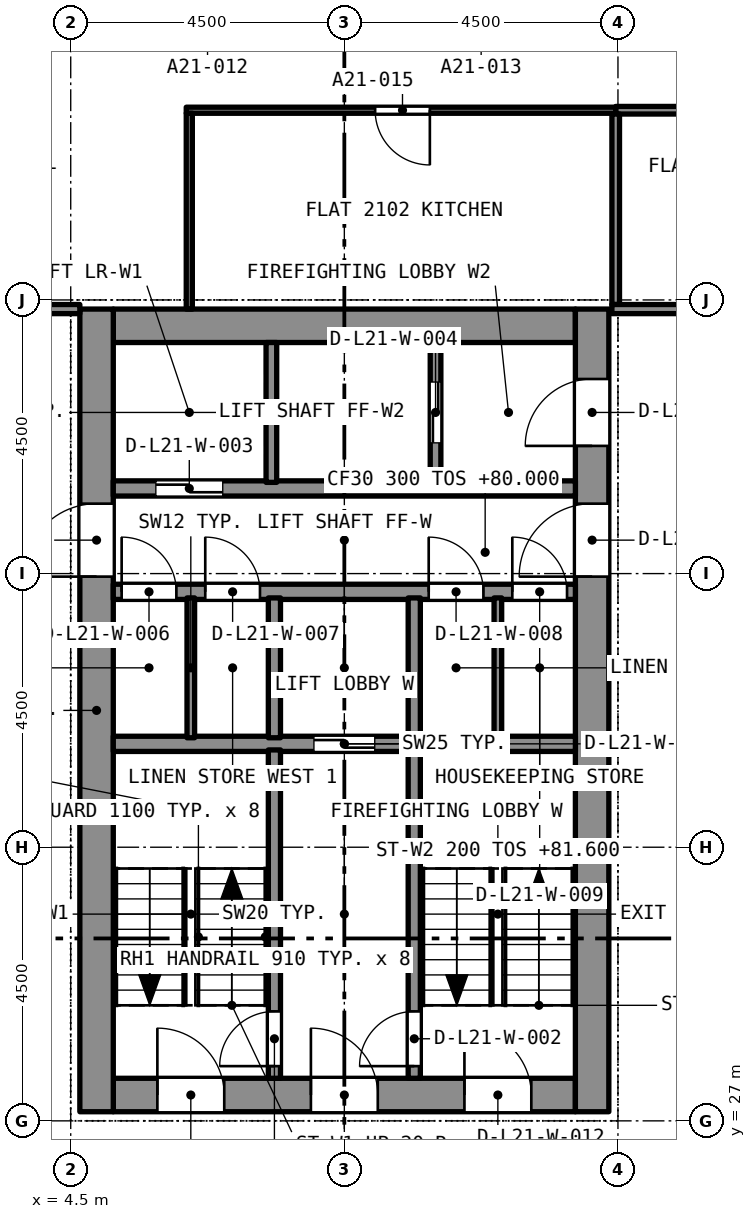
"""IFC4 building model, lengths in metres.
Left out: names, types, materials, properties, quantities, classifications, styles, units other than length and angle.
Written with IfcOpenShell. Run it as: python <this file> out.ifc"""

import sys

from ifc_helpers import new_model, si_unit, direction, frame, frame_2d, origin, place, context, subcontext, project, spatial, rectangle, extrude, element, fill, save


model = new_model("IFC4")
c1 = context("Model", 3, precision=1e-05, world=origin(), true_north=direction((0.0, 1.0)))
c2 = subcontext(c1, "Body", "Model", "MODEL_VIEW")
j1 = project(units=[si_unit("LENGTHUNIT", "METRE"), si_unit("PLANEANGLEUNIT", "RADIAN")], contexts=[c1])
p1 = place(None, origin())
s1 = spatial("IfcSite", under=j1, at=p1, CompositionType="ELEMENT")
p2 = place(p1, origin())
s2 = spatial("IfcBuilding", under=s1, at=p2, CompositionType="ELEMENT")
p3 = place(p2, frame((0.0, 0.0, 80.0)))
s3 = spatial("IfcBuildingStorey", under=s2, at=p3, CompositionType="ELEMENT", Elevation=80.0)
p4 = place(p3, frame((5.2, 27.425, 0.0), z_axis=(0.0, 0.0, 1.0), x_axis=(1.0, 0.0, 0.0)))
e1 = element("IfcWall", 1, at=p4, inside=s3, PredefinedType="SOLIDWALL", context=c2, shape_type="SweptSolid", body=[
    extrude(rectangle(XDim=7.6, YDim=0.55, at=frame_2d((3.8, 0.0))), origin(), (0.0, 0.0, 1.0), 3.2),
])
p5 = place(p4, frame((0.725, 0.0, 0.0)))
e2 = element("IfcOpeningElement", 2, at=p5, cuts=e1, PredefinedType="OPENING", context=c2, shape_type="SweptSolid", body=[
    extrude(rectangle(XDim=1.1, YDim=2.1, at=frame_2d((0.55, 1.05))), frame((0.0, 0.285, 0.0), z_axis=(0.0, -1.0, 0.0), x_axis=(1.0, 0.0, 0.0)), (0.0, 0.0, 1.0), 0.57),
])
p6 = place(p4, frame((3.25, 0.0, 0.0)))
e3 = element("IfcOpeningElement", 3, at=p6, cuts=e1, PredefinedType="OPENING", context=c2, shape_type="SweptSolid", body=[
    extrude(rectangle(XDim=1.1, YDim=2.1, at=frame_2d((0.55, 1.05))), frame((0.0, 0.285, 0.0), z_axis=(0.0, -1.0, 0.0), x_axis=(1.0, 0.0, 0.0)), (0.0, 0.0, 1.0), 0.57),
])
p7 = place(p4, frame((5.775, 0.0, 0.0)))
e4 = element("IfcOpeningElement", 4, at=p7, cuts=e1, PredefinedType="OPENING", context=c2, shape_type="SweptSolid", body=[
    extrude(rectangle(XDim=1.1, YDim=2.1, at=frame_2d((0.55, 1.05))), frame((0.0, 0.285, 0.0), z_axis=(0.0, -1.0, 0.0), x_axis=(1.0, 0.0, 0.0)), (0.0, 0.0, 1.0), 0.57),
])
p8 = place(p3, frame((5.2, 40.075, 0.0), z_axis=(0.0, 0.0, 1.0), x_axis=(1.0, 0.0, 0.0)))
e5 = element("IfcWall", 5, at=p8, inside=s3, PredefinedType="SOLIDWALL", context=c2, shape_type="SweptSolid", body=[
    extrude(rectangle(XDim=7.6, YDim=0.55, at=frame_2d((3.8, 0.0))), origin(), (0.0, 0.0, 1.0), 3.2),
])
p9 = place(p3, frame((4.925, 27.15, 0.0), z_axis=(0.0, 0.0, 1.0), x_axis=(0.0, 1.0, 0.0)))
e6 = element("IfcWall", 6, at=p9, inside=s3, PredefinedType="SOLIDWALL", context=c2, shape_type="SweptSolid", body=[
    extrude(rectangle(XDim=13.2, YDim=0.55, at=frame_2d((6.6, 0.0))), origin(), (0.0, 0.0, 1.0), 3.2),
])
p10 = place(p9, frame((8.8, 0.0, 0.0)))
e7 = element("IfcOpeningElement", 7, at=p10, cuts=e6, PredefinedType="OPENING", context=c2, shape_type="SweptSolid", body=[
    extrude(rectangle(XDim=1.2, YDim=2.1, at=frame_2d((0.6, 1.05))), frame((0.0, 0.285, 0.0), z_axis=(0.0, -1.0, 0.0), x_axis=(1.0, 0.0, 0.0)), (0.0, 0.0, 1.0), 0.57),
])
p11 = place(p3, frame((13.075, 27.15, 0.0), z_axis=(0.0, 0.0, 1.0), x_axis=(0.0, 1.0, 0.0)))
e8 = element("IfcWall", 8, at=p11, inside=s3, PredefinedType="SOLIDWALL", context=c2, shape_type="SweptSolid", body=[
    extrude(rectangle(XDim=13.2, YDim=0.55, at=frame_2d((6.6, 0.0))), origin(), (0.0, 0.0, 1.0), 3.2),
])
p12 = place(p11, frame((10.95, 0.0, 0.0)))
e9 = element("IfcOpeningElement", 9, at=p12, cuts=e8, PredefinedType="OPENING", context=c2, shape_type="SweptSolid", body=[
    extrude(rectangle(XDim=1.1, YDim=2.1, at=frame_2d((0.55, 1.05))), frame((0.0, 0.285, 0.0), z_axis=(0.0, -1.0, 0.0), x_axis=(1.0, 0.0, 0.0)), (0.0, 0.0, 1.0), 0.57),
])
p13 = place(p11, frame((8.8, 0.0, 0.0)))
e10 = element("IfcOpeningElement", 10, at=p13, cuts=e8, PredefinedType="OPENING", context=c2, shape_type="SweptSolid", body=[
    extrude(rectangle(XDim=1.2, YDim=2.1, at=frame_2d((0.6, 1.05))), frame((0.0, 0.285, 0.0), z_axis=(0.0, -1.0, 0.0), x_axis=(1.0, 0.0, 0.0)), (0.0, 0.0, 1.0), 0.57),
])
p14 = place(p3, frame((17.9, 43.62, 0.0), z_axis=(0.0, 0.0, 1.0), x_axis=(-1.0, 0.0, 0.0)))
e11 = element("IfcWall", 11, at=p14, inside=s3, PredefinedType="PARTITIONING", context=c2, shape_type="SweptSolid", body=[
    extrude(rectangle(XDim=4.437, YDim=0.125, at=frame_2d((2.219, 0.0))), origin(), (0.0, 0.0, 1.0), 2.9),
])
p15 = place(p14, frame((1.769, 0.0, 0.0)))
e12 = element("IfcOpeningElement", 12, at=p15, cuts=e11, PredefinedType="OPENING", context=c2, shape_type="SweptSolid", body=[
    extrude(rectangle(XDim=0.8, YDim=2.1, at=frame_2d((0.4, 1.05))), frame((0.0, 0.073, 0.0), z_axis=(0.0, -1.0, 0.0), x_axis=(1.0, 0.0, 0.0)), (0.0, 0.0, 1.0), 0.145),
])
p16 = place(p3, frame((13.463, 40.425, 0.0), z_axis=(0.0, 0.0, 1.0), x_axis=(0.0, 1.0, 0.0)))
e13 = element("IfcWall", 13, at=p16, inside=s3, PredefinedType="PARTITIONING", context=c2, shape_type="SweptSolid", body=[
    extrude(rectangle(XDim=3.133, YDim=0.125, at=frame_2d((1.566, 0.0))), origin(), (0.0, 0.0, 1.0), 2.9),
])
p17 = place(p3, frame((13.4, 40.35, 0.0), z_axis=(0.0, 0.0, 1.0), x_axis=(1.0, 0.0, 0.0)))
e14 = element("IfcWall", 14, at=p17, inside=s3, PredefinedType="PARTITIONING", context=c2, shape_type="SweptSolid", body=[
    extrude(rectangle(XDim=4.025, YDim=0.15, at=frame_2d((2.012, 0.0))), origin(), (0.0, 0.0, 1.0), 2.9),
])
p18 = place(p3, frame((13.463, 43.62, 0.0), z_axis=(0.0, 0.0, 1.0), x_axis=(-1.0, 0.0, 0.0)))
e15 = element("IfcWall", 15, at=p18, inside=s3, PredefinedType="PARTITIONING", context=c2, shape_type="SweptSolid", body=[
    extrude(rectangle(XDim=7.063, YDim=0.1, at=frame_2d((3.531, 0.0))), origin(), (0.0, 0.0, 1.0), 2.9),
])
p19 = place(p18, frame((3.056, 0.0, 0.0)))
e16 = element("IfcOpeningElement", 16, at=p19, cuts=e15, PredefinedType="OPENING", context=c2, shape_type="SweptSolid", body=[
    extrude(rectangle(XDim=0.9, YDim=2.1, at=frame_2d((0.45, 1.05))), frame((0.0, 0.06, 0.0), z_axis=(0.0, -1.0, 0.0), x_axis=(1.0, 0.0, 0.0)), (0.0, 0.0, 1.0), 0.12),
])
p20 = place(p3, frame((6.45, 40.35, 0.0), z_axis=(0.0, 0.0, 1.0), x_axis=(0.0, 1.0, 0.0)))
e17 = element("IfcWall", 17, at=p20, inside=s3, PredefinedType="PARTITIONING", context=c2, shape_type="SweptSolid", body=[
    extrude(rectangle(XDim=3.22, YDim=0.1, at=frame_2d((1.61, 0.0))), origin(), (0.0, 0.0, 1.0), 2.9),
])
p21 = place(p3, frame((0.575, 40.35, 0.0), z_axis=(0.0, 0.0, 1.0), x_axis=(1.0, 0.0, 0.0)))
e18 = element("IfcWall", 18, at=p21, inside=s3, PredefinedType="PARTITIONING", context=c2, shape_type="SweptSolid", body=[
    extrude(rectangle(XDim=4.075, YDim=0.15, at=frame_2d((2.038, 0.0))), origin(), (0.0, 0.0, 1.0), 2.9),
])
p22 = place(p21, frame((1.175, 0.0, 0.0)))
e19 = element("IfcOpeningElement", 19, at=p22, cuts=e18, PredefinedType="OPENING", context=c2, shape_type="SweptSolid", body=[
    extrude(rectangle(XDim=1.0, YDim=2.1, at=frame_2d((0.5, 1.05))), frame((0.0, 0.085, 0.0), z_axis=(0.0, -1.0, 0.0), x_axis=(1.0, 0.0, 0.0)), (0.0, 0.0, 1.0), 0.17),
])
p23 = place(p3, frame((5.2, 33.2, 0.0), z_axis=(0.0, 0.0, 1.0), x_axis=(1.0, 0.0, 0.0)))
e20 = element("IfcWall", 20, at=p23, inside=s3, PredefinedType="SOLIDWALL", context=c2, shape_type="SweptSolid", body=[
    extrude(rectangle(XDim=7.6, YDim=0.25, at=frame_2d((3.8, 0.0))), origin(), (0.0, 0.0, 1.0), 2.9),
])
p24 = place(p23, frame((3.3, 0.0, 0.0)))
e21 = element("IfcOpeningElement", 21, at=p24, cuts=e20, PredefinedType="OPENING", context=c2, shape_type="SweptSolid", body=[
    extrude(rectangle(XDim=1.0, YDim=2.1, at=frame_2d((0.5, 1.05))), frame((0.0, 0.135, 0.0), z_axis=(0.0, -1.0, 0.0), x_axis=(1.0, 0.0, 0.0)), (0.0, 0.0, 1.0), 0.27),
])
p25 = place(p3, frame((5.2, 35.7, 0.0), z_axis=(0.0, 0.0, 1.0), x_axis=(1.0, 0.0, 0.0)))
e22 = element("IfcWall", 22, at=p25, inside=s3, PredefinedType="SOLIDWALL", context=c2, shape_type="SweptSolid", body=[
    extrude(rectangle(XDim=7.6, YDim=0.25, at=frame_2d((3.8, 0.0))), origin(), (0.0, 0.0, 1.0), 2.9),
])
p26 = place(p25, frame((0.137, 0.0, 0.0)))
e23 = element("IfcOpeningElement", 23, at=p26, cuts=e22, PredefinedType="OPENING", context=c2, shape_type="SweptSolid", body=[
    extrude(rectangle(XDim=0.9, YDim=2.1, at=frame_2d((0.45, 1.05))), frame((0.0, 0.135, 0.0), z_axis=(0.0, -1.0, 0.0), x_axis=(1.0, 0.0, 0.0)), (0.0, 0.0, 1.0), 0.27),
])
p27 = place(p25, frame((1.512, 0.0, 0.0)))
e24 = element("IfcOpeningElement", 24, at=p27, cuts=e22, PredefinedType="OPENING", context=c2, shape_type="SweptSolid", body=[
    extrude(rectangle(XDim=0.9, YDim=2.1, at=frame_2d((0.45, 1.05))), frame((0.0, 0.135, 0.0), z_axis=(0.0, -1.0, 0.0), x_axis=(1.0, 0.0, 0.0)), (0.0, 0.0, 1.0), 0.27),
])
p28 = place(p25, frame((5.188, 0.0, 0.0)))
e25 = element("IfcOpeningElement", 25, at=p28, cuts=e22, PredefinedType="OPENING", context=c2, shape_type="SweptSolid", body=[
    extrude(rectangle(XDim=0.9, YDim=2.1, at=frame_2d((0.45, 1.05))), frame((0.0, 0.135, 0.0), z_axis=(0.0, -1.0, 0.0), x_axis=(1.0, 0.0, 0.0)), (0.0, 0.0, 1.0), 0.27),
])
p29 = place(p25, frame((6.562, 0.0, 0.0)))
e26 = element("IfcOpeningElement", 26, at=p29, cuts=e22, PredefinedType="OPENING", context=c2, shape_type="SweptSolid", body=[
    extrude(rectangle(XDim=0.9, YDim=2.1, at=frame_2d((0.45, 1.05))), frame((0.0, 0.135, 0.0), z_axis=(0.0, -1.0, 0.0), x_axis=(1.0, 0.0, 0.0)), (0.0, 0.0, 1.0), 0.27),
])
p30 = place(p3, frame((5.2, 37.4, 0.0), z_axis=(0.0, 0.0, 1.0), x_axis=(1.0, 0.0, 0.0)))
e27 = element("IfcWall", 27, at=p30, inside=s3, PredefinedType="SOLIDWALL", context=c2, shape_type="SweptSolid", body=[
    extrude(rectangle(XDim=7.6, YDim=0.25, at=frame_2d((3.8, 0.0))), origin(), (0.0, 0.0, 1.0), 2.9),
])
p31 = place(p30, frame((0.7, 0.0, 0.0)))
e28 = element("IfcOpeningElement", 28, at=p31, cuts=e27, PredefinedType="OPENING", context=c2, shape_type="SweptSolid", body=[
    extrude(rectangle(XDim=1.1, YDim=2.4, at=frame_2d((0.55, 1.2))), frame((0.0, 0.135, 0.0), z_axis=(0.0, -1.0, 0.0), x_axis=(1.0, 0.0, 0.0)), (0.0, 0.0, 1.0), 0.27),
])
p32 = place(p3, frame((7.85, 27.7, 0.0), z_axis=(0.0, 0.0, 1.0), x_axis=(0.0, 1.0, 0.0)))
e29 = element("IfcWall", 29, at=p32, inside=s3, PredefinedType="SOLIDWALL", context=c2, shape_type="SweptSolid", body=[
    extrude(rectangle(XDim=5.4, YDim=0.2, at=frame_2d((2.7, 0.0))), origin(), (0.0, 0.0, 1.0), 2.9),
])
p33 = place(p32, frame((0.2, 0.0, 0.0)))
e30 = element("IfcOpeningElement", 30, at=p33, cuts=e29, PredefinedType="OPENING", context=c2, shape_type="SweptSolid", body=[
    extrude(rectangle(XDim=0.9, YDim=2.1, at=frame_2d((0.45, 1.05))), frame((0.0, 0.11, 0.0), z_axis=(0.0, -1.0, 0.0), x_axis=(1.0, 0.0, 0.0)), (0.0, 0.0, 1.0), 0.22),
])
p34 = place(p3, frame((10.15, 27.7, 0.0), z_axis=(0.0, 0.0, 1.0), x_axis=(0.0, 1.0, 0.0)))
e31 = element("IfcWall", 31, at=p34, inside=s3, PredefinedType="SOLIDWALL", context=c2, shape_type="SweptSolid", body=[
    extrude(rectangle(XDim=5.4, YDim=0.2, at=frame_2d((2.7, 0.0))), origin(), (0.0, 0.0, 1.0), 2.9),
])
p35 = place(p34, frame((0.2, 0.0, 0.0)))
e32 = element("IfcOpeningElement", 32, at=p35, cuts=e31, PredefinedType="OPENING", context=c2, shape_type="SweptSolid", body=[
    extrude(rectangle(XDim=0.9, YDim=2.1, at=frame_2d((0.45, 1.05))), frame((0.0, 0.11, 0.0), z_axis=(0.0, -1.0, 0.0), x_axis=(1.0, 0.0, 0.0)), (0.0, 0.0, 1.0), 0.22),
])
for number, where, z_axis, x_axis in (
    (33, (7.85, 33.3, 0.0), (0.0, 0.0, 1.0), (0.0, 1.0, 0.0)),
    (34, (10.15, 33.3, 0.0), (0.0, 0.0, 1.0), (0.0, 1.0, 0.0)),
):
    element("IfcWall", number, at=place(p3, frame(where, z_axis=z_axis, x_axis=x_axis)), inside=s3, PredefinedType="SOLIDWALL", context=c2, shape_type="SweptSolid", body=[
        extrude(rectangle(XDim=2.3, YDim=0.2, at=frame_2d((1.15, 0.0))), origin(), (0.0, 0.0, 1.0), 2.9),
    ])
p36 = place(p3, frame((7.8, 37.5, 0.0), z_axis=(0.0, 0.0, 1.0), x_axis=(0.0, 1.0, 0.0)))
e35 = element("IfcWall", 35, at=p36, inside=s3, PredefinedType="SOLIDWALL", context=c2, shape_type="SweptSolid", body=[
    extrude(rectangle(XDim=2.3, YDim=0.175, at=frame_2d((1.15, 0.0))), origin(), (0.0, 0.0, 1.0), 2.9),
])
p37 = place(p3, frame((10.5, 37.5, 0.0), z_axis=(0.0, 0.0, 1.0), x_axis=(0.0, 1.0, 0.0)))
e36 = element("IfcWall", 36, at=p37, inside=s3, PredefinedType="SOLIDWALL", context=c2, shape_type="SweptSolid", body=[
    extrude(rectangle(XDim=2.3, YDim=0.175, at=frame_2d((1.15, 0.0))), origin(), (0.0, 0.0, 1.0), 2.9),
])
p38 = place(p37, frame((0.65, 0.0, 0.0)))
e37 = element("IfcOpeningElement", 37, at=p38, cuts=e36, PredefinedType="OPENING", context=c2, shape_type="SweptSolid", body=[
    extrude(rectangle(XDim=1.0, YDim=2.1, at=frame_2d((0.5, 1.05))), frame((0.0, 0.097, 0.0), z_axis=(0.0, -1.0, 0.0), x_axis=(1.0, 0.0, 0.0)), (0.0, 0.0, 1.0), 0.195),
])
for number, where, z_axis, x_axis in (
    (38, (6.475, 33.3, 0.0), (0.0, 0.0, 1.0), (0.0, 1.0, 0.0)),
    (39, (11.525, 33.3, 0.0), (0.0, 0.0, 1.0), (0.0, 1.0, 0.0)),
):
    element("IfcWall", number, at=place(p3, frame(where, z_axis=z_axis, x_axis=x_axis)), inside=s3, PredefinedType="PARTITIONING", context=c2, shape_type="SweptSolid", body=[
        extrude(rectangle(XDim=2.3, YDim=0.125, at=frame_2d((1.15, 0.0))), origin(), (0.0, 0.0, 1.0), 2.9),
    ])
p39 = place(p19, origin())
e40 = element("IfcDoor", 40, at=p39, inside=s3, OperationType="SINGLE_SWING_LEFT", PredefinedType="DOOR", context=c2, shape_type="SweptSolid", body=[
    extrude(rectangle(XDim=0.9, YDim=2.1, at=frame_2d((0.45, 1.05))), frame((0.0, 0.025, 0.0), z_axis=(0.0, -1.0, 0.0), x_axis=(1.0, 0.0, 0.0)), (0.0, 0.0, 1.0), 0.05),
])
fill(e16, e40)
p40 = place(p33, origin())
e41 = element("IfcDoor", 41, at=p40, inside=s3, OperationType="SINGLE_SWING_LEFT", PredefinedType="DOOR", context=c2, shape_type="SweptSolid", body=[
    extrude(rectangle(XDim=0.9, YDim=2.1, at=frame_2d((0.45, 1.05))), frame((0.0, 0.025, 0.0), z_axis=(0.0, -1.0, 0.0), x_axis=(1.0, 0.0, 0.0)), (0.0, 0.0, 1.0), 0.05),
])
fill(e30, e41)
p41 = place(p35, origin())
e42 = element("IfcDoor", 42, at=p41, inside=s3, OperationType="SINGLE_SWING_LEFT", PredefinedType="DOOR", context=c2, shape_type="SweptSolid", body=[
    extrude(rectangle(XDim=0.9, YDim=2.1, at=frame_2d((0.45, 1.05))), frame((0.0, 0.025, 0.0), z_axis=(0.0, -1.0, 0.0), x_axis=(1.0, 0.0, 0.0)), (0.0, 0.0, 1.0), 0.05),
])
fill(e32, e42)
p42 = place(p31, origin())
e43 = element("IfcDoor", 43, at=p42, inside=s3, OperationType="SLIDING_TO_LEFT", PredefinedType="DOOR", context=c2, shape_type="SweptSolid", body=[
    extrude(rectangle(XDim=1.1, YDim=2.4, at=frame_2d((0.55, 1.2))), frame((0.0, 0.025, 0.0), z_axis=(0.0, -1.0, 0.0), x_axis=(1.0, 0.0, 0.0)), (0.0, 0.0, 1.0), 0.05),
])
fill(e28, e43)
p43 = place(p38, origin())
e44 = element("IfcDoor", 44, at=p43, inside=s3, OperationType="SLIDING_TO_LEFT", PredefinedType="DOOR", context=c2, shape_type="SweptSolid", body=[
    extrude(rectangle(XDim=1.0, YDim=2.1, at=frame_2d((0.5, 1.05))), frame((0.0, 0.025, 0.0), z_axis=(0.0, -1.0, 0.0), x_axis=(1.0, 0.0, 0.0)), (0.0, 0.0, 1.0), 0.05),
])
fill(e37, e44)
p44 = place(p24, origin())
e45 = element("IfcDoor", 45, at=p44, inside=s3, OperationType="SLIDING_TO_LEFT", PredefinedType="DOOR", context=c2, shape_type="SweptSolid", body=[
    extrude(rectangle(XDim=1.0, YDim=2.1, at=frame_2d((0.5, 1.05))), frame((0.0, 0.025, 0.0), z_axis=(0.0, -1.0, 0.0), x_axis=(1.0, 0.0, 0.0)), (0.0, 0.0, 1.0), 0.05),
])
fill(e21, e45)
p45 = place(p26, origin())
e46 = element("IfcDoor", 46, at=p45, inside=s3, OperationType="SINGLE_SWING_LEFT", PredefinedType="DOOR", context=c2, shape_type="SweptSolid", body=[
    extrude(rectangle(XDim=0.9, YDim=2.1, at=frame_2d((0.45, 1.05))), frame((0.0, 0.025, 0.0), z_axis=(0.0, -1.0, 0.0), x_axis=(1.0, 0.0, 0.0)), (0.0, 0.0, 1.0), 0.05),
])
fill(e23, e46)
p46 = place(p27, origin())
e47 = element("IfcDoor", 47, at=p46, inside=s3, OperationType="SINGLE_SWING_LEFT", PredefinedType="DOOR", context=c2, shape_type="SweptSolid", body=[
    extrude(rectangle(XDim=0.9, YDim=2.1, at=frame_2d((0.45, 1.05))), frame((0.0, 0.025, 0.0), z_axis=(0.0, -1.0, 0.0), x_axis=(1.0, 0.0, 0.0)), (0.0, 0.0, 1.0), 0.05),
])
fill(e24, e47)
p47 = place(p28, origin())
e48 = element("IfcDoor", 48, at=p47, inside=s3, OperationType="SINGLE_SWING_LEFT", PredefinedType="DOOR", context=c2, shape_type="SweptSolid", body=[
    extrude(rectangle(XDim=0.9, YDim=2.1, at=frame_2d((0.45, 1.05))), frame((0.0, 0.025, 0.0), z_axis=(0.0, -1.0, 0.0), x_axis=(1.0, 0.0, 0.0)), (0.0, 0.0, 1.0), 0.05),
])
fill(e25, e48)
p48 = place(p29, origin())
e49 = element("IfcDoor", 49, at=p48, inside=s3, OperationType="SINGLE_SWING_LEFT", PredefinedType="DOOR", context=c2, shape_type="SweptSolid", body=[
    extrude(rectangle(XDim=0.9, YDim=2.1, at=frame_2d((0.45, 1.05))), frame((0.0, 0.025, 0.0), z_axis=(0.0, -1.0, 0.0), x_axis=(1.0, 0.0, 0.0)), (0.0, 0.0, 1.0), 0.05),
])
fill(e26, e49)
p49 = place(p5, origin())
e50 = element("IfcDoor", 50, at=p49, inside=s3, OperationType="SINGLE_SWING_LEFT", PredefinedType="DOOR", context=c2, shape_type="SweptSolid", body=[
    extrude(rectangle(XDim=1.1, YDim=2.1, at=frame_2d((0.55, 1.05))), frame((0.0, 0.025, 0.0), z_axis=(0.0, -1.0, 0.0), x_axis=(1.0, 0.0, 0.0)), (0.0, 0.0, 1.0), 0.05),
])
fill(e2, e50)
p50 = place(p6, origin())
e51 = element("IfcDoor", 51, at=p50, inside=s3, OperationType="SINGLE_SWING_LEFT", PredefinedType="DOOR", context=c2, shape_type="SweptSolid", body=[
    extrude(rectangle(XDim=1.1, YDim=2.1, at=frame_2d((0.55, 1.05))), frame((0.0, 0.025, 0.0), z_axis=(0.0, -1.0, 0.0), x_axis=(1.0, 0.0, 0.0)), (0.0, 0.0, 1.0), 0.05),
])
fill(e3, e51)
p51 = place(p7, origin())
e52 = element("IfcDoor", 52, at=p51, inside=s3, OperationType="SINGLE_SWING_LEFT", PredefinedType="DOOR", context=c2, shape_type="SweptSolid", body=[
    extrude(rectangle(XDim=1.1, YDim=2.1, at=frame_2d((0.55, 1.05))), frame((0.0, 0.025, 0.0), z_axis=(0.0, -1.0, 0.0), x_axis=(1.0, 0.0, 0.0)), (0.0, 0.0, 1.0), 0.05),
])
fill(e4, e52)
p52 = place(p12, origin())
e53 = element("IfcDoor", 53, at=p52, inside=s3, OperationType="SINGLE_SWING_LEFT", PredefinedType="DOOR", context=c2, shape_type="SweptSolid", body=[
    extrude(rectangle(XDim=1.1, YDim=2.1, at=frame_2d((0.55, 1.05))), frame((0.0, 0.025, 0.0), z_axis=(0.0, -1.0, 0.0), x_axis=(1.0, 0.0, 0.0)), (0.0, 0.0, 1.0), 0.05),
])
fill(e9, e53)
p53 = place(p10, origin())
e54 = element("IfcDoor", 54, at=p53, inside=s3, OperationType="SINGLE_SWING_LEFT", PredefinedType="DOOR", context=c2, shape_type="SweptSolid", body=[
    extrude(rectangle(XDim=1.2, YDim=2.1, at=frame_2d((0.6, 1.05))), frame((0.0, 0.025, 0.0), z_axis=(0.0, -1.0, 0.0), x_axis=(1.0, 0.0, 0.0)), (0.0, 0.0, 1.0), 0.05),
])
fill(e7, e54)
p54 = place(p13, origin())
e55 = element("IfcDoor", 55, at=p54, inside=s3, OperationType="SINGLE_SWING_LEFT", PredefinedType="DOOR", context=c2, shape_type="SweptSolid", body=[
    extrude(rectangle(XDim=1.2, YDim=2.1, at=frame_2d((0.6, 1.05))), frame((0.0, 0.025, 0.0), z_axis=(0.0, -1.0, 0.0), x_axis=(1.0, 0.0, 0.0)), (0.0, 0.0, 1.0), 0.05),
])
fill(e10, e55)
save(model, sys.argv[1])
